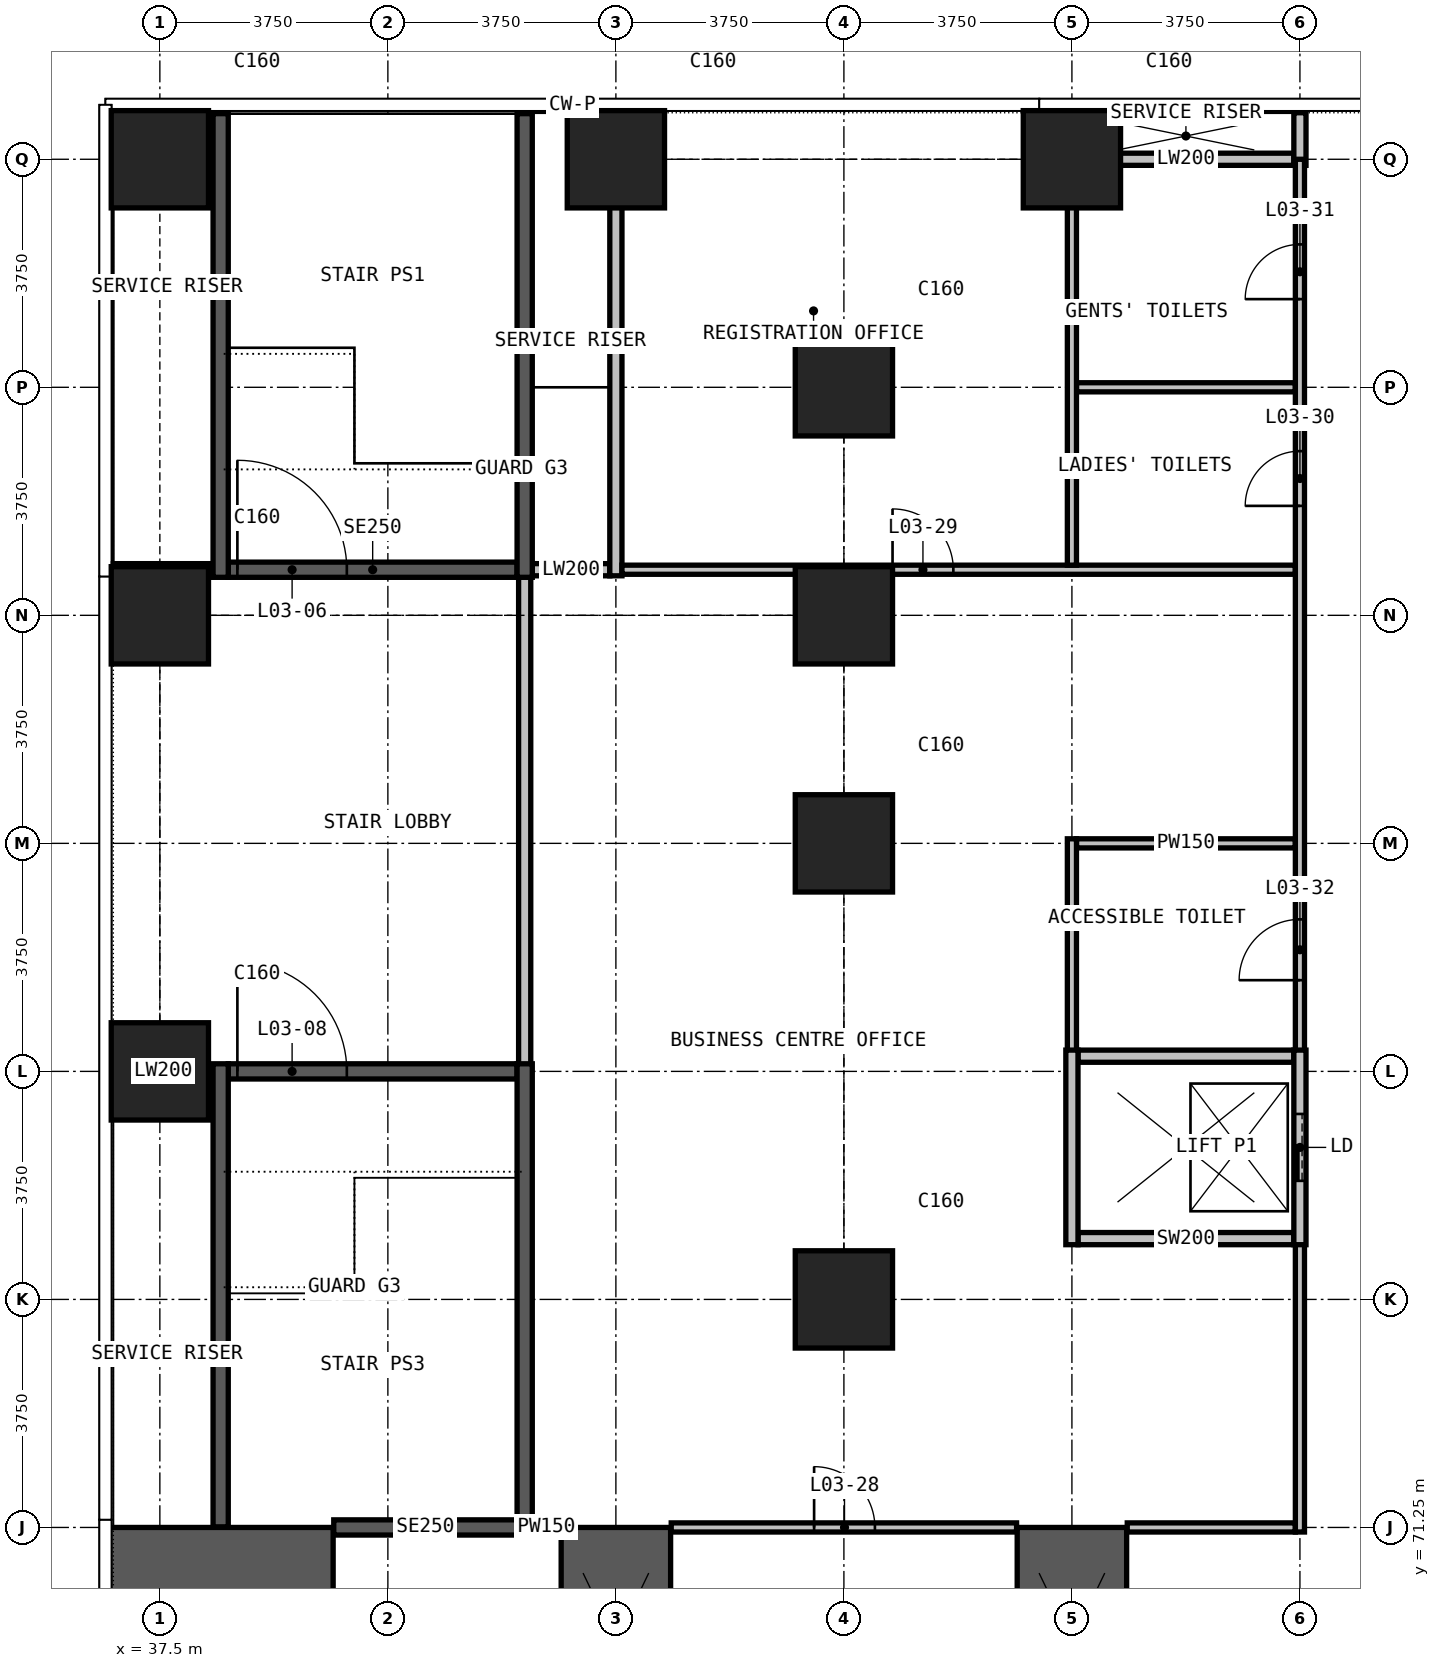
"""IFC4 building model, lengths in metres.
Left out: names, types, materials, properties, quantities, classifications, styles, units other than length and angle.
Written with IfcOpenShell. Run it as: python <this file> out.ifc"""

import sys

from ifc_helpers import new_model, si_unit, direction, frame, frame_2d, origin, origin_2d, place, context, subcontext, project, spatial, rectangle, extrude, element, fill, save


model = new_model("IFC4")
c1 = context("Model", 3, precision=1e-05, world=origin(), true_north=direction((0.0, 1.0)))
c2 = subcontext(c1, "Body", "Model", "MODEL_VIEW")
j1 = project(units=[si_unit("LENGTHUNIT", "METRE"), si_unit("PLANEANGLEUNIT", "RADIAN")], contexts=[c1])
p1 = place(None, origin())
s1 = spatial("IfcSite", under=j1, at=p1, CompositionType="ELEMENT")
p2 = place(p1, origin())
s2 = spatial("IfcBuilding", under=s1, at=p2, CompositionType="ELEMENT")
p3 = place(p2, frame((0.0, 0.0, 24.0)))
s3 = spatial("IfcBuildingStorey", under=s2, at=p3, CompositionType="ELEMENT", Elevation=24.0)
p4 = place(p3, frame((38.475, 67.5, 0.0), z_axis=(0.0, 0.0, 1.0), x_axis=(0.0, 1.0, 0.0)))
e1 = element("IfcWall", 1, at=p4, inside=s3, PredefinedType="SHEAR", context=c2, shape_type="SweptSolid", body=[
    extrude(rectangle(XDim=3.75, YDim=3.75, at=frame_2d((1.875, 0.0))), origin(), (0.0, 0.0, 1.0), 6.0),
])
for number, where, z_axis, x_axis in (
    (2, (45.0, 67.5, 0.0), (0.0, 0.0, 1.0), (0.0, 1.0, 0.0)),
    (3, (52.5, 67.5, 0.0), (0.0, 0.0, 1.0), (0.0, 1.0, 0.0)),
):
    element("IfcWall", number, at=place(p3, frame(where, z_axis=z_axis, x_axis=x_axis)), inside=s3, PredefinedType="SHEAR", context=c2, shape_type="SweptSolid", body=[
        extrude(rectangle(XDim=3.75, YDim=1.8, at=frame_2d((1.875, 0.0))), origin(), (0.0, 0.0, 1.0), 6.0),
    ])
for number, where, z_axis, x_axis in (
    (4, (37.5, 78.75, 0.0), (0.0, 0.0, 1.0), (1.0, 0.0, 0.0)),
    (5, (37.5, 86.25, 0.0), (0.0, 0.0, 1.0), (1.0, 0.0, 0.0)),
    (6, (37.5, 93.75, 0.0), (0.0, 0.0, 1.0), (1.0, 0.0, 0.0)),
    (7, (45.0, 93.75, 0.0), (0.0, 0.0, 1.0), (1.0, 0.0, 0.0)),
    (8, (48.75, 75.0, 0.0), (0.0, 0.0, 1.0), (1.0, 0.0, 0.0)),
    (9, (48.75, 82.5, 0.0), (0.0, 0.0, 1.0), (1.0, 0.0, 0.0)),
    (10, (48.75, 86.25, 0.0), (0.0, 0.0, 1.0), (1.0, 0.0, 0.0)),
    (11, (48.75, 90.0, 0.0), (0.0, 0.0, 1.0), (1.0, 0.0, 0.0)),
    (12, (52.5, 93.75, 0.0), (0.0, 0.0, 1.0), (1.0, 0.0, 0.0)),
):
    element("IfcColumn", number, at=place(p3, frame(where, z_axis=z_axis, x_axis=x_axis)), inside=s3, PredefinedType="COLUMN", context=c2, shape_type="SweptSolid", body=[
        extrude(rectangle(XDim=1.6, YDim=1.6, at=origin_2d()), origin(), (0.0, 0.0, 1.0), 6.0),
    ])
for number, where, z_axis, x_axis in (
    (13, (36.735, 78.75, 0.0), (0.0, 0.0, 1.0), (1.0, 0.0, 0.0)),
    (14, (36.735, 87.0, 0.0), (0.0, 0.0, 1.0), (1.0, 0.0, 0.0)),
):
    element("IfcWall", number, at=place(p3, frame(where, z_axis=z_axis, x_axis=x_axis)), inside=s3, PredefinedType="PARTITIONING", context=c2, shape_type="SweptSolid", body=[
        extrude(rectangle(XDim=1.64, YDim=0.2, at=frame_2d((0.82, 0.0))), origin(), (0.0, 0.0, 1.0), 5.65),
    ])
p5 = place(p3, frame((43.625, 87.0, 0.0), z_axis=(0.0, 0.0, 1.0), x_axis=(1.0, 0.0, 0.0)))
e15 = element("IfcWall", 15, at=p5, inside=s3, PredefinedType="PARTITIONING", context=c2, shape_type="SweptSolid", body=[
    extrude(rectangle(XDim=1.275, YDim=0.2, at=frame_2d((0.637, 0.0))), origin(), (0.0, 0.0, 1.0), 5.65),
])
p6 = place(p3, frame((52.6, 93.75, 0.0), z_axis=(0.0, 0.0, 1.0), x_axis=(1.0, 0.0, 0.0)))
e16 = element("IfcWall", 16, at=p6, inside=s3, PredefinedType="PARTITIONING", context=c2, shape_type="SweptSolid", body=[
    extrude(rectangle(XDim=3.55, YDim=0.2, at=frame_2d((1.775, 0.0))), origin(), (0.0, 0.0, 1.0), 5.65),
])
p7 = place(p3, frame((43.5, 78.625, 0.0), z_axis=(0.0, 0.0, 1.0), x_axis=(0.0, 1.0, 0.0)))
e17 = element("IfcWall", 17, at=p7, inside=s3, PredefinedType="PARTITIONING", context=c2, shape_type="SweptSolid", body=[
    extrude(rectangle(XDim=8.5, YDim=0.2, at=frame_2d((4.25, 0.0))), origin(), (0.0, 0.0, 1.0), 5.65),
])
p8 = place(p3, frame((45.0, 86.9, 0.0), z_axis=(0.0, 0.0, 1.0), x_axis=(0.0, 1.0, 0.0)))
e18 = element("IfcWall", 18, at=p8, inside=s3, PredefinedType="PARTITIONING", context=c2, shape_type="SweptSolid", body=[
    extrude(rectangle(XDim=7.615, YDim=0.2, at=frame_2d((3.808, 0.0))), origin(), (0.0, 0.0, 1.0), 5.65),
])
for number, where, z_axis, x_axis in (
    (19, (52.5, 93.65, 0.0), (0.0, 0.0, 1.0), (0.0, 1.0, 0.0)),
    (20, (56.25, 93.65, 0.0), (0.0, 0.0, 1.0), (0.0, 1.0, 0.0)),
):
    element("IfcWall", number, at=place(p3, frame(where, z_axis=z_axis, x_axis=x_axis)), inside=s3, PredefinedType="PARTITIONING", context=c2, shape_type="SweptSolid", body=[
        extrude(rectangle(XDim=0.865, YDim=0.2, at=frame_2d((0.433, 0.0))), origin(), (0.0, 0.0, 1.0), 5.65),
    ])
p9 = place(p3, frame((43.625, 71.25, 0.0), z_axis=(0.0, 0.0, 1.0), x_axis=(1.0, 0.0, 0.0)))
e21 = element("IfcWall", 21, at=p9, inside=s3, PredefinedType="PARTITIONING", context=c2, shape_type="SweptSolid", body=[
    extrude(rectangle(XDim=0.465, YDim=0.15, at=frame_2d((0.232, 0.0))), origin(), (0.0, 0.0, 1.0), 5.65),
])
p10 = place(p3, frame((45.91, 71.25, 0.0), z_axis=(0.0, 0.0, 1.0), x_axis=(1.0, 0.0, 0.0)))
e22 = element("IfcWall", 22, at=p10, inside=s3, PredefinedType="PARTITIONING", context=c2, shape_type="SweptSolid", body=[
    extrude(rectangle(XDim=5.68, YDim=0.15, at=frame_2d((2.84, 0.0))), origin(), (0.0, 0.0, 1.0), 5.65),
])
p11 = place(p10, frame((2.35, 0.0, 0.0)))
e23 = element("IfcOpeningElement", 23, at=p11, cuts=e22, PredefinedType="OPENING", context=c2, shape_type="SweptSolid", body=[
    extrude(rectangle(XDim=1.0, YDim=2.2, at=frame_2d((0.5, 1.1))), frame((0.0, 0.085, 0.0), z_axis=(0.0, -1.0, 0.0), x_axis=(1.0, 0.0, 0.0)), (0.0, 0.0, 1.0), 0.17),
])
p12 = place(p3, frame((53.41, 71.25, 0.0), z_axis=(0.0, 0.0, 1.0), x_axis=(1.0, 0.0, 0.0)))
e24 = element("IfcWall", 24, at=p12, inside=s3, PredefinedType="PARTITIONING", context=c2, shape_type="SweptSolid", body=[
    extrude(rectangle(XDim=2.765, YDim=0.15, at=frame_2d((1.383, 0.0))), origin(), (0.0, 0.0, 1.0), 5.65),
])
p13 = place(p3, frame((52.575, 82.5, 0.0), z_axis=(0.0, 0.0, 1.0), x_axis=(1.0, 0.0, 0.0)))
e25 = element("IfcWall", 25, at=p13, inside=s3, PredefinedType="PARTITIONING", context=c2, shape_type="SweptSolid", body=[
    extrude(rectangle(XDim=3.6, YDim=0.15, at=frame_2d((1.8, 0.0))), origin(), (0.0, 0.0, 1.0), 5.65),
])
p14 = place(p3, frame((45.1, 87.0, 0.0), z_axis=(0.0, 0.0, 1.0), x_axis=(1.0, 0.0, 0.0)))
e26 = element("IfcWall", 26, at=p14, inside=s3, PredefinedType="PARTITIONING", context=c2, shape_type="SweptSolid", body=[
    extrude(rectangle(XDim=11.075, YDim=0.15, at=frame_2d((5.538, 0.0))), origin(), (0.0, 0.0, 1.0), 5.65),
])
p15 = place(p14, frame((4.45, 0.0, 0.0)))
e27 = element("IfcOpeningElement", 27, at=p15, cuts=e26, PredefinedType="OPENING", context=c2, shape_type="SweptSolid", body=[
    extrude(rectangle(XDim=1.0, YDim=2.2, at=frame_2d((0.5, 1.1))), frame((0.0, 0.085, 0.0), z_axis=(0.0, -1.0, 0.0), x_axis=(1.0, 0.0, 0.0)), (0.0, 0.0, 1.0), 0.17),
])
p16 = place(p3, frame((52.575, 90.0, 0.0), z_axis=(0.0, 0.0, 1.0), x_axis=(1.0, 0.0, 0.0)))
e28 = element("IfcWall", 28, at=p16, inside=s3, PredefinedType="PARTITIONING", context=c2, shape_type="SweptSolid", body=[
    extrude(rectangle(XDim=3.6, YDim=0.15, at=frame_2d((1.8, 0.0))), origin(), (0.0, 0.0, 1.0), 5.65),
])
p17 = place(p3, frame((52.5, 78.9, 0.0), z_axis=(0.0, 0.0, 1.0), x_axis=(0.0, 1.0, 0.0)))
e29 = element("IfcWall", 29, at=p17, inside=s3, PredefinedType="PARTITIONING", context=c2, shape_type="SweptSolid", body=[
    extrude(rectangle(XDim=3.675, YDim=0.15, at=frame_2d((1.837, 0.0))), origin(), (0.0, 0.0, 1.0), 5.65),
])
p18 = place(p3, frame((52.5, 87.075, 0.0), z_axis=(0.0, 0.0, 1.0), x_axis=(0.0, 1.0, 0.0)))
e30 = element("IfcWall", 30, at=p18, inside=s3, PredefinedType="PARTITIONING", context=c2, shape_type="SweptSolid", body=[
    extrude(rectangle(XDim=6.675, YDim=0.15, at=frame_2d((3.337, 0.0))), origin(), (0.0, 0.0, 1.0), 5.65),
])
p19 = place(p3, frame((56.25, 71.175, 0.0), z_axis=(0.0, 0.0, 1.0), x_axis=(0.0, 1.0, 0.0)))
e31 = element("IfcWall", 31, at=p19, inside=s3, PredefinedType="PARTITIONING", context=c2, shape_type="SweptSolid", body=[
    extrude(rectangle(XDim=4.925, YDim=0.15, at=frame_2d((2.462, 0.0))), origin(), (0.0, 0.0, 1.0), 5.65),
])
p20 = place(p3, frame((56.25, 78.9, 0.0), z_axis=(0.0, 0.0, 1.0), x_axis=(0.0, 1.0, 0.0)))
e32 = element("IfcWall", 32, at=p20, inside=s3, PredefinedType="PARTITIONING", context=c2, shape_type="SweptSolid", body=[
    extrude(rectangle(XDim=14.85, YDim=0.15, at=frame_2d((7.425, 0.0))), origin(), (0.0, 0.0, 1.0), 5.65),
])
p21 = place(p20, frame((9.15, 0.0, 0.0)))
e33 = element("IfcOpeningElement", 33, at=p21, cuts=e32, PredefinedType="OPENING", context=c2, shape_type="SweptSolid", body=[
    extrude(rectangle(XDim=0.9, YDim=2.2, at=frame_2d((0.45, 1.1))), frame((0.0, 0.085, 0.0), z_axis=(0.0, -1.0, 0.0), x_axis=(1.0, 0.0, 0.0)), (0.0, 0.0, 1.0), 0.17),
])
p22 = place(p20, frame((12.55, 0.0, 0.0)))
e34 = element("IfcOpeningElement", 34, at=p22, cuts=e32, PredefinedType="OPENING", context=c2, shape_type="SweptSolid", body=[
    extrude(rectangle(XDim=0.9, YDim=2.2, at=frame_2d((0.45, 1.1))), frame((0.0, 0.085, 0.0), z_axis=(0.0, -1.0, 0.0), x_axis=(1.0, 0.0, 0.0)), (0.0, 0.0, 1.0), 0.17),
])
p23 = place(p20, frame((1.35, 0.0, 0.0)))
e35 = element("IfcOpeningElement", 35, at=p23, cuts=e32, PredefinedType="OPENING", context=c2, shape_type="SweptSolid", body=[
    extrude(rectangle(XDim=1.0, YDim=2.2, at=frame_2d((0.5, 1.1))), frame((0.0, 0.085, 0.0), z_axis=(0.0, -1.0, 0.0), x_axis=(1.0, 0.0, 0.0)), (0.0, 0.0, 1.0), 0.17),
])
for number, where, z_axis, x_axis in (
    (36, (52.6, 76.0, 0.0), (0.0, 0.0, 1.0), (1.0, 0.0, 0.0)),
    (37, (52.6, 79.0, 0.0), (0.0, 0.0, 1.0), (1.0, 0.0, 0.0)),
):
    element("IfcWall", number, at=place(p3, frame(where, z_axis=z_axis, x_axis=x_axis)), inside=s3, PredefinedType="PARTITIONING", context=c2, shape_type="SweptSolid", body=[
        extrude(rectangle(XDim=3.55, YDim=0.2, at=frame_2d((1.775, 0.0))), origin(), (0.0, 0.0, 1.0), 5.65),
    ])
p24 = place(p3, frame((52.5, 75.9, 0.0), z_axis=(0.0, 0.0, 1.0), x_axis=(0.0, 1.0, 0.0)))
e38 = element("IfcWall", 38, at=p24, inside=s3, PredefinedType="PARTITIONING", context=c2, shape_type="SweptSolid", body=[
    extrude(rectangle(XDim=3.2, YDim=0.2, at=frame_2d((1.6, 0.0))), origin(), (0.0, 0.0, 1.0), 5.65),
])
p25 = place(p3, frame((56.25, 75.9, 0.0), z_axis=(0.0, 0.0, 1.0), x_axis=(0.0, 1.0, 0.0)))
e39 = element("IfcWall", 39, at=p25, inside=s3, PredefinedType="PARTITIONING", context=c2, shape_type="SweptSolid", body=[
    extrude(rectangle(XDim=3.2, YDim=0.2, at=frame_2d((1.6, 0.0))), origin(), (0.0, 0.0, 1.0), 5.65),
])
p26 = place(p25, frame((1.05, 0.0, 0.0)))
e40 = element("IfcOpeningElement", 40, at=p26, cuts=e39, PredefinedType="OPENING", context=c2, shape_type="SweptSolid", body=[
    extrude(rectangle(XDim=1.1, YDim=2.2, at=frame_2d((0.55, 1.1))), frame((0.0, 0.11, 0.0), z_axis=(0.0, -1.0, 0.0), x_axis=(1.0, 0.0, 0.0)), (0.0, 0.0, 1.0), 0.22),
])
p27 = place(p3, frame((40.36, 71.25, 0.0), z_axis=(0.0, 0.0, 1.0), x_axis=(1.0, 0.0, 0.0)))
e41 = element("IfcWall", 41, at=p27, inside=s3, PredefinedType="PARTITIONING", context=c2, shape_type="SweptSolid", body=[
    extrude(rectangle(XDim=3.015, YDim=0.25, at=frame_2d((1.507, 0.0))), origin(), (0.0, 0.0, 1.0), 5.65),
])
p28 = place(p3, frame((38.625, 78.75, 0.0), z_axis=(0.0, 0.0, 1.0), x_axis=(1.0, 0.0, 0.0)))
e42 = element("IfcWall", 42, at=p28, inside=s3, PredefinedType="PARTITIONING", context=c2, shape_type="SweptSolid", body=[
    extrude(rectangle(XDim=4.75, YDim=0.25, at=frame_2d((2.375, 0.0))), origin(), (0.0, 0.0, 1.0), 5.65),
])
p29 = place(p28, frame((0.15, 0.0, 0.0)))
e43 = element("IfcOpeningElement", 43, at=p29, cuts=e42, PredefinedType="OPENING", context=c2, shape_type="SweptSolid", body=[
    extrude(rectangle(XDim=1.8, YDim=2.2, at=frame_2d((0.9, 1.1))), frame((0.0, 0.135, 0.0), z_axis=(0.0, -1.0, 0.0), x_axis=(1.0, 0.0, 0.0)), (0.0, 0.0, 1.0), 0.27),
])
p30 = place(p3, frame((38.625, 87.0, 0.0), z_axis=(0.0, 0.0, 1.0), x_axis=(1.0, 0.0, 0.0)))
e44 = element("IfcWall", 44, at=p30, inside=s3, PredefinedType="PARTITIONING", context=c2, shape_type="SweptSolid", body=[
    extrude(rectangle(XDim=4.75, YDim=0.25, at=frame_2d((2.375, 0.0))), origin(), (0.0, 0.0, 1.0), 5.65),
])
p31 = place(p30, frame((0.15, 0.0, 0.0)))
e45 = element("IfcOpeningElement", 45, at=p31, cuts=e44, PredefinedType="OPENING", context=c2, shape_type="SweptSolid", body=[
    extrude(rectangle(XDim=1.8, YDim=2.2, at=frame_2d((0.9, 1.1))), frame((0.0, 0.135, 0.0), z_axis=(0.0, -1.0, 0.0), x_axis=(1.0, 0.0, 0.0)), (0.0, 0.0, 1.0), 0.27),
])
p32 = place(p3, frame((38.5, 71.26, 0.0), z_axis=(0.0, 0.0, 1.0), x_axis=(0.0, 1.0, 0.0)))
e46 = element("IfcWall", 46, at=p32, inside=s3, PredefinedType="PARTITIONING", context=c2, shape_type="SweptSolid", body=[
    extrude(rectangle(XDim=7.615, YDim=0.25, at=frame_2d((3.808, 0.0))), origin(), (0.0, 0.0, 1.0), 5.65),
])
p33 = place(p3, frame((38.5, 86.875, 0.0), z_axis=(0.0, 0.0, 1.0), x_axis=(0.0, 1.0, 0.0)))
e47 = element("IfcWall", 47, at=p33, inside=s3, PredefinedType="PARTITIONING", context=c2, shape_type="SweptSolid", body=[
    extrude(rectangle(XDim=7.625, YDim=0.25, at=frame_2d((3.812, 0.0))), origin(), (0.0, 0.0, 1.0), 5.65),
])
p34 = place(p3, frame((43.5, 71.125, 0.0), z_axis=(0.0, 0.0, 1.0), x_axis=(0.0, 1.0, 0.0)))
e48 = element("IfcWall", 48, at=p34, inside=s3, PredefinedType="PARTITIONING", context=c2, shape_type="SweptSolid", body=[
    extrude(rectangle(XDim=7.75, YDim=0.25, at=frame_2d((3.875, 0.0))), origin(), (0.0, 0.0, 1.0), 5.65),
])
p35 = place(p3, frame((43.5, 86.875, 0.0), z_axis=(0.0, 0.0, 1.0), x_axis=(0.0, 1.0, 0.0)))
e49 = element("IfcWall", 49, at=p35, inside=s3, PredefinedType="PARTITIONING", context=c2, shape_type="SweptSolid", body=[
    extrude(rectangle(XDim=7.625, YDim=0.25, at=frame_2d((3.812, 0.0))), origin(), (0.0, 0.0, 1.0), 5.65),
])
p36 = place(p31, origin())
e50 = element("IfcDoor", 50, at=p36, inside=s3, OperationType="DOUBLE_DOOR_SINGLE_SWING", PredefinedType="DOOR", context=c2, shape_type="SweptSolid", body=[
    extrude(rectangle(XDim=1.8, YDim=2.2, at=frame_2d((0.9, 1.1))), frame((0.0, 0.025, 0.0), z_axis=(0.0, -1.0, 0.0), x_axis=(1.0, 0.0, 0.0)), (0.0, 0.0, 1.0), 0.05),
])
fill(e45, e50)
p37 = place(p29, origin())
e51 = element("IfcDoor", 51, at=p37, inside=s3, OperationType="DOUBLE_DOOR_SINGLE_SWING", PredefinedType="DOOR", context=c2, shape_type="SweptSolid", body=[
    extrude(rectangle(XDim=1.8, YDim=2.2, at=frame_2d((0.9, 1.1))), frame((0.0, 0.025, 0.0), z_axis=(0.0, -1.0, 0.0), x_axis=(1.0, 0.0, 0.0)), (0.0, 0.0, 1.0), 0.05),
])
fill(e43, e51)
p38 = place(p26, origin())
e52 = element("IfcDoor", 52, at=p38, inside=s3, OperationType="DOUBLE_DOOR_SLIDING", PredefinedType="DOOR", context=c2, shape_type="SweptSolid", body=[
    extrude(rectangle(XDim=1.1, YDim=2.2, at=frame_2d((0.55, 1.1))), frame((0.0, 0.025, 0.0), z_axis=(0.0, -1.0, 0.0), x_axis=(1.0, 0.0, 0.0)), (0.0, 0.0, 1.0), 0.05),
])
fill(e40, e52)
p39 = place(p11, origin())
e53 = element("IfcDoor", 53, at=p39, inside=s3, OperationType="SINGLE_SWING_LEFT", PredefinedType="DOOR", context=c2, shape_type="SweptSolid", body=[
    extrude(rectangle(XDim=1.0, YDim=2.2, at=frame_2d((0.5, 1.1))), frame((0.0, 0.025, 0.0), z_axis=(0.0, -1.0, 0.0), x_axis=(1.0, 0.0, 0.0)), (0.0, 0.0, 1.0), 0.05),
])
fill(e23, e53)
p40 = place(p15, origin())
e54 = element("IfcDoor", 54, at=p40, inside=s3, OperationType="SINGLE_SWING_RIGHT", PredefinedType="DOOR", context=c2, shape_type="SweptSolid", body=[
    extrude(rectangle(XDim=1.0, YDim=2.2, at=frame_2d((0.5, 1.1))), frame((0.0, 0.025, 0.0), z_axis=(0.0, -1.0, 0.0), x_axis=(1.0, 0.0, 0.0)), (0.0, 0.0, 1.0), 0.05),
])
fill(e27, e54)
p41 = place(p21, origin())
e55 = element("IfcDoor", 55, at=p41, inside=s3, OperationType="SINGLE_SWING_LEFT", PredefinedType="DOOR", context=c2, shape_type="SweptSolid", body=[
    extrude(rectangle(XDim=0.9, YDim=2.2, at=frame_2d((0.45, 1.1))), frame((0.0, 0.025, 0.0), z_axis=(0.0, -1.0, 0.0), x_axis=(1.0, 0.0, 0.0)), (0.0, 0.0, 1.0), 0.05),
])
fill(e33, e55)
p42 = place(p22, origin())
e56 = element("IfcDoor", 56, at=p42, inside=s3, OperationType="SINGLE_SWING_RIGHT", PredefinedType="DOOR", context=c2, shape_type="SweptSolid", body=[
    extrude(rectangle(XDim=0.9, YDim=2.2, at=frame_2d((0.45, 1.1))), frame((0.0, 0.025, 0.0), z_axis=(0.0, -1.0, 0.0), x_axis=(1.0, 0.0, 0.0)), (0.0, 0.0, 1.0), 0.05),
])
fill(e34, e56)
p43 = place(p23, origin())
e57 = element("IfcDoor", 57, at=p43, inside=s3, OperationType="SINGLE_SWING_LEFT", PredefinedType="DOOR", context=c2, shape_type="SweptSolid", body=[
    extrude(rectangle(XDim=1.0, YDim=2.2, at=frame_2d((0.5, 1.1))), frame((0.0, 0.025, 0.0), z_axis=(0.0, -1.0, 0.0), x_axis=(1.0, 0.0, 0.0)), (0.0, 0.0, 1.0), 0.05),
])
fill(e35, e57)
save(model, sys.argv[1])
